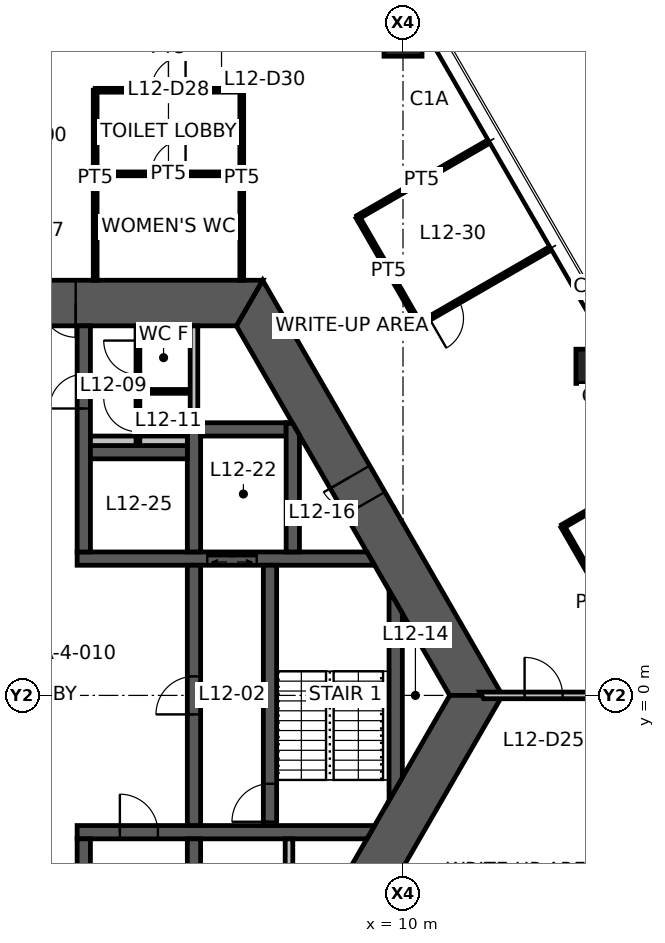
"""IFC4 building model, lengths in metres.
Left out: names, types, materials, properties, quantities, classifications, styles, units other than length and angle.
Written with IfcOpenShell. Run it as: python <this file> out.ifc"""

import sys

from ifc_helpers import new_model, si_unit, direction, frame, frame_2d, origin, origin_2d, place, context, subcontext, project, spatial, polyline, rectangle, hollow_rectangle, outline, extrude, element, fill, save


model = new_model("IFC4")
c1 = context("Model", 3, precision=1e-05, world=origin(), true_north=direction((0.0, 1.0)))
c2 = subcontext(c1, "Body", "Model", "MODEL_VIEW")
j1 = project(units=[si_unit("LENGTHUNIT", "METRE"), si_unit("PLANEANGLEUNIT", "RADIAN")], contexts=[c1])
p1 = place(None, origin())
s1 = spatial("IfcSite", under=j1, at=p1, CompositionType="ELEMENT")
p2 = place(p1, origin())
s2 = spatial("IfcBuilding", under=s1, at=p2, CompositionType="ELEMENT")
p3 = place(p2, frame((0.0, 0.0, 47.8)))
s3 = spatial("IfcBuildingStorey", under=s2, at=p3, CompositionType="ELEMENT", Elevation=47.8)
p4 = place(p3, frame((10.0, 17.321, 0.0), z_axis=(0.0, 0.0, 1.0), x_axis=(1.0, 0.0, 0.0)))
e1 = element("IfcColumn", 1, at=p4, inside=s3, PredefinedType="COLUMN", context=c2, shape_type="SweptSolid", body=[
    extrude(hollow_rectangle(XDim=1.0, YDim=1.0, WallThickness=0.06, at=origin_2d()), origin(), (0.0, 0.0, 1.0), 4.2),
])
p5 = place(p3, frame((15.0, 8.66, 0.0), z_axis=(0.0, 0.0, 1.0), x_axis=(1.0, 0.0, 0.0)))
e2 = element("IfcColumn", 2, at=p5, inside=s3, PredefinedType="COLUMN", context=c2, shape_type="SweptSolid", body=[
    extrude(hollow_rectangle(XDim=0.9, YDim=0.9, WallThickness=0.05, at=origin_2d()), origin(), (0.0, 0.0, 1.0), 4.2),
])
p6 = place(p3, frame((11.922, 0.0, 0.0), z_axis=(0.0, 0.0, 1.0), x_axis=(-0.500004296715, 0.866022923061, 0.0)))
e3 = element("IfcWall", 3, at=p6, inside=s3, PredefinedType="SHEAR", context=c2, shape_type="SweptSolid", body=[
    extrude(outline(polyline([(-0.346, -0.6), (5.835, -0.6), (6.635, -0.6), (12.269, -0.6), (11.576, 0.6), (6.635, 0.6), (5.835, 0.6), (0.346, 0.6), (-0.346, -0.6)])), origin(), (0.0, 0.0, 1.0), 4.2),
])
p7 = place(p6, frame((5.835, 0.0, 0.0)))
e4 = element("IfcOpeningElement", 4, at=p7, cuts=e3, PredefinedType="OPENING", context=c2, shape_type="SweptSolid", body=[
    extrude(rectangle(XDim=0.8, YDim=2.1, at=frame_2d((0.4, 1.05))), frame((0.0, 0.61, 0.0), z_axis=(0.0, -1.0, 0.0), x_axis=(1.0, 0.0, 0.0)), (0.0, 0.0, 1.0), 1.22),
])
p8 = place(p3, frame((5.961, 10.325, 0.0), z_axis=(0.0, 0.0, 1.0), x_axis=(-1.0, 0.0, 0.0)))
e5 = element("IfcWall", 5, at=p8, inside=s3, PredefinedType="SHEAR", context=c2, shape_type="SweptSolid", body=[
    extrude(outline(polyline([(-0.346, -0.6), (4.574, -0.6), (5.474, -0.6), (6.449, -0.6), (7.349, -0.6), (12.269, -0.6), (11.576, 0.6), (7.349, 0.6), (6.449, 0.6), (5.474, 0.6), (4.574, 0.6), (0.346, 0.6), (-0.346, -0.6)])), origin(), (0.0, 0.0, 1.0), 4.2),
])
p9 = place(p8, frame((6.449, 0.0, 0.0)))
e6 = element("IfcOpeningElement", 6, at=p9, cuts=e5, PredefinedType="OPENING", context=c2, shape_type="SweptSolid", body=[
    extrude(rectangle(XDim=0.9, YDim=2.1, at=frame_2d((0.45, 1.05))), frame((0.0, 0.61, 0.0), z_axis=(0.0, -1.0, 0.0), x_axis=(1.0, 0.0, 0.0)), (0.0, 0.0, 1.0), 1.22),
])
p10 = place(p8, frame((4.574, 0.0, 0.0)))
e7 = element("IfcOpeningElement", 7, at=p10, cuts=e5, PredefinedType="OPENING", context=c2, shape_type="SweptSolid", body=[
    extrude(rectangle(XDim=0.9, YDim=2.1, at=frame_2d((0.45, 1.05))), frame((0.0, 0.61, 0.0), z_axis=(0.0, -1.0, 0.0), x_axis=(1.0, 0.0, 0.0)), (0.0, 0.0, 1.0), 1.22),
])
p11 = place(p3, frame((5.961, -10.325, 0.0), z_axis=(0.0, 0.0, 1.0), x_axis=(0.500004296715, 0.866022923061, 0.0)))
e8 = element("IfcWall", 8, at=p11, inside=s3, PredefinedType="SHEAR", context=c2, shape_type="SweptSolid", body=[
    extrude(outline(polyline([(-0.346, -0.6), (3.208, -0.6), (4.009, -0.6), (12.269, -0.6), (11.576, 0.6), (4.009, 0.6), (3.208, 0.6), (0.346, 0.6), (-0.346, -0.6)])), origin(), (0.0, 0.0, 1.0), 4.2),
])
p12 = place(p11, frame((3.208, 0.0, 0.0)))
e9 = element("IfcOpeningElement", 9, at=p12, cuts=e8, PredefinedType="OPENING", context=c2, shape_type="SweptSolid", body=[
    extrude(rectangle(XDim=0.8, YDim=2.1, at=frame_2d((0.4, 1.05))), frame((0.0, 0.61, 0.0), z_axis=(0.0, -1.0, 0.0), x_axis=(1.0, 0.0, 0.0)), (0.0, 0.0, 1.0), 1.22),
])
p13 = place(p3, frame((1.425, 3.6, 0.0), z_axis=(0.0, 0.0, 1.0), x_axis=(1.0, 0.0, 0.0)))
e10 = element("IfcWall", 10, at=p13, inside=s3, PredefinedType="SHEAR", context=c2, shape_type="SweptSolid", body=[
    extrude(outline(polyline([(0.0, -0.175), (3.425, -0.175), (4.725, -0.175), (7.827, -0.175), (7.625, 0.175), (4.725, 0.175), (3.425, 0.175), (0.0, 0.175), (0.0, -0.175)])), origin(), (0.0, 0.0, 1.0), 4.2),
])
p14 = place(p13, frame((3.425, 0.0, 0.0)))
e11 = element("IfcOpeningElement", 11, at=p14, cuts=e10, PredefinedType="OPENING", context=c2, shape_type="SweptSolid", body=[
    extrude(rectangle(XDim=1.3, YDim=2.1, at=frame_2d((0.65, 1.05))), frame((0.0, 0.185, 0.0), z_axis=(0.0, -1.0, 0.0), x_axis=(1.0, 0.0, 0.0)), (0.0, 0.0, 1.0), 0.37),
])
p15 = place(p3, frame((1.425, -3.6, 0.0), z_axis=(0.0, 0.0, 1.0), x_axis=(1.0, 0.0, 0.0)))
e12 = element("IfcWall", 12, at=p15, inside=s3, PredefinedType="SHEAR", context=c2, shape_type="SweptSolid", body=[
    extrude(outline(polyline([(0.0, -0.175), (1.125, -0.175), (2.125, -0.175), (7.625, -0.175), (7.827, 0.175), (2.125, 0.175), (1.125, 0.175), (0.0, 0.175), (0.0, -0.175)])), origin(), (0.0, 0.0, 1.0), 4.2),
])
p16 = place(p15, frame((1.125, 0.0, 0.0)))
e13 = element("IfcOpeningElement", 13, at=p16, cuts=e12, PredefinedType="OPENING", context=c2, shape_type="SweptSolid", body=[
    extrude(rectangle(XDim=1.0, YDim=2.1, at=frame_2d((0.5, 1.05))), frame((0.0, 0.185, 0.0), z_axis=(0.0, -1.0, 0.0), x_axis=(1.0, 0.0, 0.0)), (0.0, 0.0, 1.0), 0.37),
])
p17 = place(p3, frame((1.6, 3.775, 0.0), z_axis=(0.0, 0.0, 1.0), x_axis=(0.0, 1.0, 0.0)))
e14 = element("IfcWall", 14, at=p17, inside=s3, PredefinedType="SHEAR", context=c2, shape_type="SweptSolid", body=[
    extrude(rectangle(XDim=5.95, YDim=0.35, at=frame_2d((2.975, 0.0))), origin(), (0.0, 0.0, 1.0), 4.2),
])
p18 = place(p17, frame((3.775, 0.0, 0.0)))
e15 = element("IfcOpeningElement", 15, at=p18, cuts=e14, PredefinedType="OPENING", context=c2, shape_type="SweptSolid", body=[
    extrude(rectangle(XDim=0.9, YDim=2.1, at=frame_2d((0.45, 1.05))), frame((0.0, 0.185, 0.0), z_axis=(0.0, -1.0, 0.0), x_axis=(1.0, 0.0, 0.0)), (0.0, 0.0, 1.0), 0.37),
])
p19 = place(p3, frame((1.6, -3.775, 0.0), z_axis=(0.0, 0.0, 1.0), x_axis=(0.0, -1.0, 0.0)))
e16 = element("IfcWall", 16, at=p19, inside=s3, PredefinedType="SHEAR", context=c2, shape_type="SweptSolid", body=[
    extrude(rectangle(XDim=5.95, YDim=0.35, at=frame_2d((2.975, 0.0))), origin(), (0.0, 0.0, 1.0), 4.2),
])
p20 = place(p19, frame((3.625, 0.0, 0.0)))
e17 = element("IfcOpeningElement", 17, at=p20, cuts=e16, PredefinedType="OPENING", context=c2, shape_type="SweptSolid", body=[
    extrude(rectangle(XDim=1.2, YDim=2.1, at=frame_2d((0.6, 1.05))), frame((0.0, 0.185, 0.0), z_axis=(0.0, -1.0, 0.0), x_axis=(1.0, 0.0, 0.0)), (0.0, 0.0, 1.0), 0.37),
])
p21 = place(p3, frame((4.5, -3.425, 0.0), z_axis=(0.0, 0.0, 1.0), x_axis=(0.0, 1.0, 0.0)))
e18 = element("IfcWall", 18, at=p21, inside=s3, PredefinedType="SHEAR", context=c2, shape_type="SweptSolid", body=[
    extrude(rectangle(XDim=6.85, YDim=0.35, at=frame_2d((3.425, 0.0))), origin(), (0.0, 0.0, 1.0), 4.2),
])
p22 = place(p21, frame((2.925, 0.0, 0.0)))
e19 = element("IfcOpeningElement", 19, at=p22, cuts=e18, PredefinedType="OPENING", context=c2, shape_type="SweptSolid", body=[
    extrude(rectangle(XDim=1.0, YDim=2.1, at=frame_2d((0.5, 1.05))), frame((0.0, 0.185, 0.0), z_axis=(0.0, -1.0, 0.0), x_axis=(1.0, 0.0, 0.0)), (0.0, 0.0, 1.0), 0.37),
])
p23 = place(p3, frame((6.5, -3.425, 0.0), z_axis=(0.0, 0.0, 1.0), x_axis=(0.0, 1.0, 0.0)))
e20 = element("IfcWall", 20, at=p23, inside=s3, PredefinedType="SHEAR", context=c2, shape_type="SweptSolid", body=[
    extrude(rectangle(XDim=6.85, YDim=0.35, at=frame_2d((3.425, 0.0))), origin(), (0.0, 0.0, 1.0), 4.2),
])
p24 = place(p23, frame((0.1, 0.0, 0.0)))
e21 = element("IfcOpeningElement", 21, at=p24, cuts=e20, PredefinedType="OPENING", context=c2, shape_type="SweptSolid", body=[
    extrude(rectangle(XDim=1.0, YDim=2.1, at=frame_2d((0.5, 1.05))), frame((0.0, 0.185, 0.0), z_axis=(0.0, -1.0, 0.0), x_axis=(1.0, 0.0, 0.0)), (0.0, 0.0, 1.0), 0.37),
])
p25 = place(p3, frame((4.5, 3.775, 0.0), z_axis=(0.0, 0.0, 1.0), x_axis=(0.0, 1.0, 0.0)))
e22 = element("IfcWall", 22, at=p25, inside=s3, PredefinedType="SHEAR", context=c2, shape_type="SweptSolid", body=[
    extrude(rectangle(XDim=3.4, YDim=0.35, at=frame_2d((1.7, 0.0))), origin(), (0.0, 0.0, 1.0), 4.2),
])
p26 = place(p3, frame((4.5, -3.775, 0.0), z_axis=(0.0, 0.0, 1.0), x_axis=(0.0, -1.0, 0.0)))
e23 = element("IfcWall", 23, at=p26, inside=s3, PredefinedType="SHEAR", context=c2, shape_type="SweptSolid", body=[
    extrude(rectangle(XDim=5.95, YDim=0.35, at=frame_2d((2.975, 0.0))), origin(), (0.0, 0.0, 1.0), 4.2),
])
p27 = place(p26, frame((0.712, 0.0, 0.0)))
e24 = element("IfcOpeningElement", 24, at=p27, cuts=e23, PredefinedType="OPENING", context=c2, shape_type="SweptSolid", body=[
    extrude(rectangle(XDim=1.1, YDim=2.1, at=frame_2d((0.55, 1.05))), frame((0.0, 0.185, 0.0), z_axis=(0.0, -1.0, 0.0), x_axis=(1.0, 0.0, 0.0)), (0.0, 0.0, 1.0), 0.37),
])
p28 = place(p3, frame((1.775, 6.4, 0.0), z_axis=(0.0, 0.0, 1.0), x_axis=(1.0, 0.0, 0.0)))
e25 = element("IfcWall", 25, at=p28, inside=s3, PredefinedType="SHEAR", context=c2, shape_type="SweptSolid", body=[
    extrude(rectangle(XDim=2.55, YDim=0.35, at=frame_2d((1.275, 0.0))), origin(), (0.0, 0.0, 1.0), 4.2),
])
p29 = place(p3, frame((4.675, 7.0, 0.0), z_axis=(0.0, 0.0, 1.0), x_axis=(1.0, 0.0, 0.0)))
e26 = element("IfcWall", 26, at=p29, inside=s3, PredefinedType="SHEAR", context=c2, shape_type="SweptSolid", body=[
    extrude(rectangle(XDim=2.25, YDim=0.35, at=frame_2d((1.125, 0.0))), origin(), (0.0, 0.0, 1.0), 4.2),
])
p30 = place(p3, frame((7.1, 3.775, 0.0), z_axis=(0.0, 0.0, 1.0), x_axis=(0.0, 1.0, 0.0)))
e27 = element("IfcWall", 27, at=p30, inside=s3, PredefinedType="SHEAR", context=c2, shape_type="SweptSolid", body=[
    extrude(outline(polyline([(0.0, -0.175), (3.074, -0.175), (3.377, 0.0), (3.4, 0.175), (0.0, 0.175), (0.0, -0.175)])), origin(), (0.0, 0.0, 1.0), 4.2),
])
p31 = place(p3, frame((9.808, -2.462, 0.0), z_axis=(0.0, 0.0, 1.0), x_axis=(0.0, 1.0, 0.0)))
e28 = element("IfcWall", 28, at=p31, inside=s3, PredefinedType="SHEAR", context=c2, shape_type="SweptSolid", body=[
    extrude(outline(polyline([(0.303, -0.175), (4.621, -0.175), (5.228, 0.175), (-0.303, 0.175), (0.303, -0.175)])), origin(), (0.0, 0.0, 1.0), 4.2),
])
p32 = place(p3, frame((4.5, 7.175, 0.0), z_axis=(0.0, 0.0, 1.0), x_axis=(0.0, 1.0, 0.0)))
e29 = element("IfcWall", 29, at=p32, inside=s3, PredefinedType="STANDARD", context=c2, shape_type="SweptSolid", body=[
    extrude(rectangle(XDim=2.55, YDim=0.2, at=frame_2d((1.275, 0.0))), origin(), (0.0, 0.0, 1.0), 4.2),
])
p33 = place(p3, frame((7.0, -3.775, 0.0), z_axis=(0.0, 0.0, 1.0), x_axis=(0.0, -1.0, 0.0)))
e30 = element("IfcWall", 30, at=p33, inside=s3, PredefinedType="STANDARD", context=c2, shape_type="SweptSolid", body=[
    extrude(rectangle(XDim=2.525, YDim=0.2, at=frame_2d((1.263, 0.0))), origin(), (0.0, 0.0, 1.0), 4.2),
])
p34 = place(p3, frame((1.775, 6.7, 0.0), z_axis=(0.0, 0.0, 1.0), x_axis=(1.0, 0.0, 0.0)))
e31 = element("IfcWall", 31, at=p34, inside=s3, PredefinedType="PLUMBINGWALL", context=c2, shape_type="SweptSolid", body=[
    extrude(rectangle(XDim=2.55, YDim=0.25, at=frame_2d((1.275, 0.0))), origin(), (0.0, 0.0, 1.0), 4.2),
])
p35 = place(p3, frame((3.025, 6.575, 0.0), z_axis=(0.0, 0.0, 1.0), x_axis=(0.0, 1.0, 0.0)))
e32 = element("IfcWall", 32, at=p35, inside=s3, PredefinedType="PARTITIONING", context=c2, shape_type="SweptSolid", body=[
    extrude(rectangle(XDim=3.15, YDim=0.1, at=frame_2d((1.575, 0.0))), origin(), (0.0, 0.0, 1.0), 2.65),
])
p36 = place(p35, frame((1.863, 0.0, 0.0)))
e33 = element("IfcOpeningElement", 33, at=p36, cuts=e32, PredefinedType="OPENING", context=c2, shape_type="SweptSolid", body=[
    extrude(rectangle(XDim=0.9, YDim=2.1, at=frame_2d((0.45, 1.05))), frame((0.0, 0.06, 0.0), z_axis=(0.0, -1.0, 0.0), x_axis=(1.0, 0.0, 0.0)), (0.0, 0.0, 1.0), 0.12),
])
p37 = place(p35, frame((0.363, 0.0, 0.0)))
e34 = element("IfcOpeningElement", 34, at=p37, cuts=e32, PredefinedType="OPENING", context=c2, shape_type="SweptSolid", body=[
    extrude(rectangle(XDim=0.9, YDim=2.1, at=frame_2d((0.45, 1.05))), frame((0.0, 0.06, 0.0), z_axis=(0.0, -1.0, 0.0), x_axis=(1.0, 0.0, 0.0)), (0.0, 0.0, 1.0), 0.12),
])
p38 = place(p3, frame((3.075, 8.0, 0.0), z_axis=(0.0, 0.0, 1.0), x_axis=(1.0, 0.0, 0.0)))
e35 = element("IfcWall", 35, at=p38, inside=s3, PredefinedType="PARTITIONING", context=c2, shape_type="SweptSolid", body=[
    extrude(rectangle(XDim=1.25, YDim=0.1, at=frame_2d((0.625, 0.0))), origin(), (0.0, 0.0, 1.0), 2.65),
])
p39 = place(p3, frame((12.07, 0.0, 0.0), z_axis=(0.0, 0.0, 1.0), x_axis=(1.0, 0.0, 0.0)))
e36 = element("IfcWall", 36, at=p39, inside=s3, PredefinedType="PARTITIONING", context=c2, shape_type="SweptSolid", body=[
    extrude(outline(polyline([(0.051, -0.087), (1.129, -0.087), (2.129, -0.087), (7.93, -0.087), (7.93, 0.087), (2.129, 0.087), (1.129, 0.087), (-0.051, 0.087), (0.051, -0.087)])), origin(), (0.0, 0.0, 1.0), 3.05),
])
p40 = place(p39, frame((1.129, 0.0, 0.0)))
e37 = element("IfcOpeningElement", 37, at=p40, cuts=e36, PredefinedType="OPENING", context=c2, shape_type="SweptSolid", body=[
    extrude(rectangle(XDim=1.0, YDim=2.1, at=frame_2d((0.5, 1.05))), frame((0.0, 0.098, 0.0), z_axis=(0.0, -1.0, 0.0), x_axis=(1.0, 0.0, 0.0)), (0.0, 0.0, 1.0), 0.195),
])
p41 = place(p3, frame((1.9, 13.725, 0.0), z_axis=(0.0, 0.0, 1.0), x_axis=(1.0, 0.0, 0.0)))
e38 = element("IfcWall", 38, at=p41, inside=s3, PredefinedType="PARTITIONING", context=c2, shape_type="SweptSolid", body=[
    extrude(rectangle(XDim=3.857, YDim=0.1, at=frame_2d((1.929, 0.0))), origin(), (0.0, 0.0, 1.0), 2.65),
])
p42 = place(p41, frame((1.479, 0.0, 0.0)))
e39 = element("IfcOpeningElement", 39, at=p42, cuts=e38, PredefinedType="OPENING", context=c2, shape_type="SweptSolid", body=[
    extrude(rectangle(XDim=0.9, YDim=2.1, at=frame_2d((0.45, 1.05))), frame((0.0, 0.06, 0.0), z_axis=(0.0, -1.0, 0.0), x_axis=(1.0, 0.0, 0.0)), (0.0, 0.0, 1.0), 0.12),
])
p43 = place(p3, frame((1.9, 15.925, 0.0), z_axis=(0.0, 0.0, 1.0), x_axis=(1.0, 0.0, 0.0)))
e40 = element("IfcWall", 40, at=p43, inside=s3, PredefinedType="PARTITIONING", context=c2, shape_type="SweptSolid", body=[
    extrude(rectangle(XDim=3.857, YDim=0.1, at=frame_2d((1.929, 0.0))), origin(), (0.0, 0.0, 1.0), 2.65),
])
p44 = place(p43, frame((1.479, 0.0, 0.0)))
e41 = element("IfcOpeningElement", 41, at=p44, cuts=e40, PredefinedType="OPENING", context=c2, shape_type="SweptSolid", body=[
    extrude(rectangle(XDim=0.9, YDim=2.1, at=frame_2d((0.45, 1.05))), frame((0.0, 0.06, 0.0), z_axis=(0.0, -1.0, 0.0), x_axis=(1.0, 0.0, 0.0)), (0.0, 0.0, 1.0), 0.12),
])
for number, where, z_axis, x_axis in (
    (42, (1.9, 10.925, 0.0), (0.0, 0.0, 1.0), (0.0, 1.0, 0.0)),
    (43, (5.757, 10.925, 0.0), (0.0, 0.0, 1.0), (0.0, 1.0, 0.0)),
):
    element("IfcWall", number, at=place(p3, frame(where, z_axis=z_axis, x_axis=x_axis)), inside=s3, PredefinedType="PARTITIONING", context=c2, shape_type="SweptSolid", body=[
        extrude(rectangle(XDim=5.0, YDim=0.1, at=frame_2d((2.5, 0.0))), origin(), (0.0, 0.0, 1.0), 2.65),
    ])
p45 = place(p3, frame((8.809, 12.583, 0.0), z_axis=(0.0, 0.0, 1.0), x_axis=(0.866027358884, 0.499996613652, 0.0)))
e44 = element("IfcWall", 44, at=p45, inside=s3, PredefinedType="PARTITIONING", context=c2, shape_type="SweptSolid", body=[
    extrude(rectangle(XDim=3.88, YDim=0.1, at=frame_2d((1.94, 0.0))), origin(), (0.0, 0.0, 1.0), 2.65),
])
p46 = place(p3, frame((10.432, 9.772, 0.0), z_axis=(0.0, 0.0, 1.0), x_axis=(-0.500013214685, 0.866017774148, 0.0)))
e45 = element("IfcWall", 45, at=p46, inside=s3, PredefinedType="PARTITIONING", context=c2, shape_type="SweptSolid", body=[
    extrude(rectangle(XDim=3.247, YDim=0.1, at=frame_2d((1.623, 0.0))), origin(), (0.0, 0.0, 1.0), 2.65),
])
p47 = place(p3, frame((13.792, 11.712, 0.0), z_axis=(0.0, 0.0, 1.0), x_axis=(-0.866027358884, -0.499996613652, 0.0)))
e46 = element("IfcWall", 46, at=p47, inside=s3, PredefinedType="PARTITIONING", context=c2, shape_type="SweptSolid", body=[
    extrude(rectangle(XDim=3.88, YDim=0.1, at=frame_2d((1.94, 0.0))), origin(), (0.0, 0.0, 1.0), 2.65),
])
p48 = place(p47, frame((2.68, 0.0, 0.0)))
e47 = element("IfcOpeningElement", 47, at=p48, cuts=e46, PredefinedType="OPENING", context=c2, shape_type="SweptSolid", body=[
    extrude(rectangle(XDim=0.9, YDim=2.1, at=frame_2d((0.45, 1.05))), frame((0.0, 0.06, 0.0), z_axis=(0.0, -1.0, 0.0), x_axis=(1.0, 0.0, 0.0)), (0.0, 0.0, 1.0), 0.12),
])
p49 = place(p3, frame((14.198, 4.449, 0.0), z_axis=(0.0, 0.0, 1.0), x_axis=(0.866008333849, 0.50002956483, 0.0)))
e48 = element("IfcWall", 48, at=p49, inside=s3, PredefinedType="PARTITIONING", context=c2, shape_type="SweptSolid", body=[
    extrude(rectangle(XDim=3.28, YDim=0.1, at=frame_2d((1.64, 0.0))), origin(), (0.0, 0.0, 1.0), 2.65),
])
p50 = place(p3, frame((15.822, 1.637, 0.0), z_axis=(0.0, 0.0, 1.0), x_axis=(-0.500013214685, 0.866017774148, 0.0)))
e49 = element("IfcWall", 49, at=p50, inside=s3, PredefinedType="PARTITIONING", context=c2, shape_type="SweptSolid", body=[
    extrude(rectangle(XDim=3.247, YDim=0.1, at=frame_2d((1.623, 0.0))), origin(), (0.0, 0.0, 1.0), 2.65),
])
p51 = place(p10, origin())
e50 = element("IfcDoor", 50, at=p51, inside=s3, OperationType="SINGLE_SWING_LEFT", PredefinedType="DOOR", context=c2, shape_type="SweptSolid", body=[
    extrude(rectangle(XDim=0.9, YDim=2.1, at=frame_2d((0.45, 1.05))), frame((0.0, 0.025, 0.0), z_axis=(0.0, -1.0, 0.0), x_axis=(1.0, 0.0, 0.0)), (0.0, 0.0, 1.0), 0.05),
])
fill(e7, e50)
p52 = place(p7, origin())
e51 = element("IfcDoor", 51, at=p52, inside=s3, OperationType="SINGLE_SWING_RIGHT", PredefinedType="DOOR", context=c2, shape_type="SweptSolid", body=[
    extrude(rectangle(XDim=0.8, YDim=2.1, at=frame_2d((0.4, 1.05))), frame((0.0, 0.025, 0.0), z_axis=(0.0, -1.0, 0.0), x_axis=(1.0, 0.0, 0.0)), (0.0, 0.0, 1.0), 0.05),
])
fill(e4, e51)
p53 = place(p22, origin())
e52 = element("IfcDoor", 52, at=p53, inside=s3, OperationType="SINGLE_SWING_LEFT", PredefinedType="DOOR", context=c2, shape_type="SweptSolid", body=[
    extrude(rectangle(XDim=1.0, YDim=2.1, at=frame_2d((0.5, 1.05))), frame((0.0, 0.025, 0.0), z_axis=(0.0, -1.0, 0.0), x_axis=(1.0, 0.0, 0.0)), (0.0, 0.0, 1.0), 0.05),
])
fill(e19, e52)
p54 = place(p24, origin())
e53 = element("IfcDoor", 53, at=p54, inside=s3, OperationType="SINGLE_SWING_LEFT", PredefinedType="DOOR", context=c2, shape_type="SweptSolid", body=[
    extrude(rectangle(XDim=1.0, YDim=2.1, at=frame_2d((0.5, 1.05))), frame((0.0, 0.025, 0.0), z_axis=(0.0, -1.0, 0.0), x_axis=(1.0, 0.0, 0.0)), (0.0, 0.0, 1.0), 0.05),
])
fill(e21, e53)
p55 = place(p18, origin())
e54 = element("IfcDoor", 54, at=p55, inside=s3, OperationType="SINGLE_SWING_LEFT", PredefinedType="DOOR", context=c2, shape_type="SweptSolid", body=[
    extrude(rectangle(XDim=0.9, YDim=2.1, at=frame_2d((0.45, 1.05))), frame((0.0, 0.025, 0.0), z_axis=(0.0, -1.0, 0.0), x_axis=(1.0, 0.0, 0.0)), (0.0, 0.0, 1.0), 0.05),
])
fill(e15, e54)
p56 = place(p16, origin())
e55 = element("IfcDoor", 55, at=p56, inside=s3, OperationType="SINGLE_SWING_LEFT", PredefinedType="DOOR", context=c2, shape_type="SweptSolid", body=[
    extrude(rectangle(XDim=1.0, YDim=2.1, at=frame_2d((0.5, 1.05))), frame((0.0, 0.025, 0.0), z_axis=(0.0, -1.0, 0.0), x_axis=(1.0, 0.0, 0.0)), (0.0, 0.0, 1.0), 0.05),
])
fill(e13, e55)
p57 = place(p36, origin())
e56 = element("IfcDoor", 56, at=p57, inside=s3, OperationType="SINGLE_SWING_RIGHT", PredefinedType="DOOR", context=c2, shape_type="SweptSolid", body=[
    extrude(rectangle(XDim=0.9, YDim=2.1, at=frame_2d((0.45, 1.05))), frame((0.0, 0.025, 0.0), z_axis=(0.0, -1.0, 0.0), x_axis=(1.0, 0.0, 0.0)), (0.0, 0.0, 1.0), 0.05),
])
fill(e33, e56)
p58 = place(p37, origin())
e57 = element("IfcDoor", 57, at=p58, inside=s3, OperationType="SINGLE_SWING_RIGHT", PredefinedType="DOOR", context=c2, shape_type="SweptSolid", body=[
    extrude(rectangle(XDim=0.9, YDim=2.1, at=frame_2d((0.45, 1.05))), frame((0.0, 0.025, 0.0), z_axis=(0.0, -1.0, 0.0), x_axis=(1.0, 0.0, 0.0)), (0.0, 0.0, 1.0), 0.05),
])
fill(e34, e57)
p59 = place(p40, origin())
e58 = element("IfcDoor", 58, at=p59, inside=s3, OperationType="SINGLE_SWING_LEFT", PredefinedType="DOOR", context=c2, shape_type="SweptSolid", body=[
    extrude(rectangle(XDim=1.0, YDim=2.1, at=frame_2d((0.5, 1.05))), frame((0.0, 0.025, 0.0), z_axis=(0.0, -1.0, 0.0), x_axis=(1.0, 0.0, 0.0)), (0.0, 0.0, 1.0), 0.05),
])
fill(e37, e58)
p60 = place(p42, origin())
e59 = element("IfcDoor", 59, at=p60, inside=s3, OperationType="SINGLE_SWING_RIGHT", PredefinedType="DOOR", context=c2, shape_type="SweptSolid", body=[
    extrude(rectangle(XDim=0.9, YDim=2.1, at=frame_2d((0.45, 1.05))), frame((0.0, 0.025, 0.0), z_axis=(0.0, -1.0, 0.0), x_axis=(1.0, 0.0, 0.0)), (0.0, 0.0, 1.0), 0.05),
])
fill(e39, e59)
p61 = place(p44, origin())
e60 = element("IfcDoor", 60, at=p61, inside=s3, OperationType="SINGLE_SWING_RIGHT", PredefinedType="DOOR", context=c2, shape_type="SweptSolid", body=[
    extrude(rectangle(XDim=0.9, YDim=2.1, at=frame_2d((0.45, 1.05))), frame((0.0, 0.025, 0.0), z_axis=(0.0, -1.0, 0.0), x_axis=(1.0, 0.0, 0.0)), (0.0, 0.0, 1.0), 0.05),
])
fill(e41, e60)
p62 = place(p48, origin())
e61 = element("IfcDoor", 61, at=p62, inside=s3, OperationType="SINGLE_SWING_RIGHT", PredefinedType="DOOR", context=c2, shape_type="SweptSolid", body=[
    extrude(rectangle(XDim=0.9, YDim=2.1, at=frame_2d((0.45, 1.05))), frame((0.0, 0.025, 0.0), z_axis=(0.0, -1.0, 0.0), x_axis=(1.0, 0.0, 0.0)), (0.0, 0.0, 1.0), 0.05),
])
fill(e47, e61)
p63 = place(p14, origin())
e62 = element("IfcDoor", 62, at=p63, inside=s3, OperationType="DOUBLE_DOOR_SLIDING", PredefinedType="DOOR", context=c2, shape_type="SweptSolid", body=[
    extrude(rectangle(XDim=1.3, YDim=2.1, at=frame_2d((0.65, 1.05))), frame((0.0, 0.025, 0.0), z_axis=(0.0, -1.0, 0.0), x_axis=(1.0, 0.0, 0.0)), (0.0, 0.0, 1.0), 0.05),
])
fill(e11, e62)
save(model, sys.argv[1])
